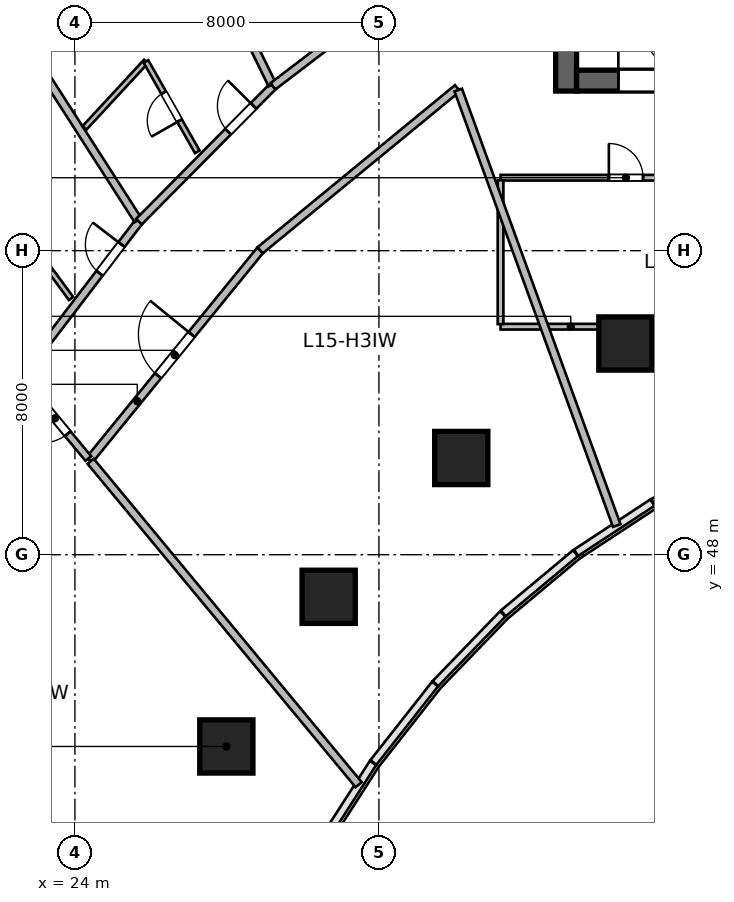
"""IFC4 building model, lengths in metres.
Left out: names, types, materials, properties, quantities, classifications, styles, units other than length and angle.
Written with IfcOpenShell. Run it as: python <this file> out.ifc"""

import sys

from ifc_helpers import new_model, si_unit, direction, frame, frame_2d, origin, origin_2d, place, context, subcontext, project, spatial, rectangle, circle, extrude, source, transform, mapped, element, fill, save


model = new_model("IFC4")
c1 = context("Model", 3, precision=1e-05, world=origin(), true_north=direction((0.0, 1.0)))
c2 = subcontext(c1, "Body", "Model", "MODEL_VIEW")
j1 = project(units=[si_unit("LENGTHUNIT", "METRE"), si_unit("PLANEANGLEUNIT", "RADIAN")], contexts=[c1])
p1 = place(None, origin())
s1 = spatial("IfcSite", under=j1, at=p1, CompositionType="ELEMENT")
p2 = place(p1, origin())
s2 = spatial("IfcBuilding", under=s1, at=p2, CompositionType="ELEMENT")
p3 = place(p2, frame((0.0, 0.0, 67.8)))
s3 = spatial("IfcBuildingStorey", under=s2, at=p3, CompositionType="ELEMENT", Elevation=67.8)
m1 = source(origin(), c2, "Body", "SweptSolid", [
    extrude(rectangle(XDim=12.0, YDim=0.55, at=frame_2d((6.0, 0.0))), origin(), (0.0, 0.0, 1.0), 3.6),
])
p4 = place(p3, frame((36.925, 60.2, 0.0), z_axis=(0.0, 0.0, 1.0), x_axis=(0.0, 1.0, 0.0)))
e1 = element("IfcWall", 1, at=p4, inside=s3, PredefinedType="SHEAR", context=c2, shape_type="MappedRepresentation", body=[
    mapped(m1, transform((0.0, 0.0, 0.0), scale=1.0)),
])
m2 = source(origin(), c2, "Body", "SweptSolid", [
    extrude(rectangle(XDim=21.6, YDim=0.55, at=frame_2d((10.8, 0.0))), origin(), (0.0, 0.0, 1.0), 3.6),
])
p5 = place(p3, frame((37.2, 60.475, 0.0), z_axis=(0.0, 0.0, 1.0), x_axis=(1.0, 0.0, 0.0)))
e2 = element("IfcWall", 2, at=p5, inside=s3, PredefinedType="SHEAR", context=c2, shape_type="MappedRepresentation", body=[
    mapped(m2, transform((0.0, 0.0, 0.0), scale=1.0)),
])
p6 = place(p5, frame((1.1, 0.0, 0.0)))
e3 = element("IfcOpeningElement", 3, at=p6, cuts=e2, PredefinedType="OPENING", context=c2, shape_type="SweptSolid", body=[
    extrude(rectangle(XDim=1.15, YDim=2.15, at=frame_2d((0.575, 1.075))), frame((0.0, 0.285, 0.0), z_axis=(0.0, -1.0, 0.0), x_axis=(1.0, 0.0, 0.0)), (0.0, 0.0, 1.0), 0.57),
])
p7 = place(p5, frame((19.5, 0.0, 0.0)))
e4 = element("IfcOpeningElement", 4, at=p7, cuts=e2, PredefinedType="OPENING", context=c2, shape_type="SweptSolid", body=[
    extrude(rectangle(XDim=0.9, YDim=2.1, at=frame_2d((0.45, 1.05))), frame((0.0, 0.285, 0.0), z_axis=(0.0, -1.0, 0.0), x_axis=(1.0, 0.0, 0.0)), (0.0, 0.0, 1.0), 0.57),
])
p8 = place(p5, frame((12.02, 0.0, 0.0)))
e5 = element("IfcOpeningElement", 5, at=p8, cuts=e2, PredefinedType="OPENING", context=c2, shape_type="SweptSolid", body=[
    extrude(rectangle(XDim=1.6, YDim=2.15, at=frame_2d((0.8, 1.075))), frame((0.0, 0.285, 0.0), z_axis=(0.0, -1.0, 0.0), x_axis=(1.0, 0.0, 0.0)), (0.0, 0.0, 1.0), 0.57),
])
m3 = source(origin(), c2, "Body", "SweptSolid", [
    extrude(circle(Radius=0.7, at=origin_2d()), origin(), (0.0, 0.0, 1.0), 3.6),
])
for number, where, z_axis, x_axis in (
    (6, (27.985, 42.955, 0.0), (0.0, 0.0, 1.0), (-0.691, 0.723, 0.0)),
    (7, (30.677, 46.892, 0.0), (0.0, 0.0, 1.0), (-0.571, 0.821, 0.0)),
    (8, (34.166, 50.545, 0.0), (0.0, 0.0, 1.0), (-0.436, 0.9, 0.0)),
    (9, (38.485, 53.558, 0.0), (0.0, 0.0, 1.0), (-0.289, 0.957, 0.0)),
):
    element("IfcColumn", number, at=place(p3, frame(where, z_axis=z_axis, x_axis=x_axis)), inside=s3, PredefinedType="COLUMN", context=c2, shape_type="MappedRepresentation", body=[
        mapped(m3, transform((0.0, 0.0, 0.0), scale=1.0)),
    ])
m4 = source(origin(), c2, "Body", "SweptSolid", [
    extrude(rectangle(XDim=6.6, YDim=0.15, at=frame_2d((3.3, 0.0))), origin(), (0.0, 0.0, 1.0), 2.803),
])
p9 = place(p3, frame((35.2, 54.0, 0.0), z_axis=(0.0, 0.0, 1.0), x_axis=(1.0, 0.0, 0.0)))
e10 = element("IfcWall", 10, at=p9, inside=s3, PredefinedType="PARTITIONING", context=c2, shape_type="MappedRepresentation", body=[
    mapped(m4, transform((0.0, 0.0, 0.0), scale=1.0)),
])
m5 = source(origin(), c2, "Body", "SweptSolid", [
    extrude(rectangle(XDim=6.6, YDim=0.15, at=frame_2d((3.3, 0.0))), origin(), (0.0, 0.0, 1.0), 3.36),
])
p10 = place(p3, frame((35.2, 57.92, 0.0), z_axis=(0.0, 0.0, 1.0), x_axis=(1.0, 0.0, 0.0)))
e11 = element("IfcWall", 11, at=p10, inside=s3, PredefinedType="PARTITIONING", context=c2, shape_type="MappedRepresentation", body=[
    mapped(m5, transform((0.0, 0.0, 0.0), scale=1.0)),
])
p11 = place(p10, frame((2.85, 0.0, 0.0)))
e12 = element("IfcOpeningElement", 12, at=p11, cuts=e11, PredefinedType="OPENING", context=c2, shape_type="SweptSolid", body=[
    extrude(rectangle(XDim=0.9, YDim=2.1, at=frame_2d((0.45, 1.05))), frame((0.0, 0.085, 0.0), z_axis=(0.0, -1.0, 0.0), x_axis=(1.0, 0.0, 0.0)), (0.0, 0.0, 1.0), 0.17),
])
m6 = source(origin(), c2, "Body", "SweptSolid", [
    extrude(rectangle(XDim=3.785, YDim=0.15, at=frame_2d((1.893, 0.0))), origin(), (0.0, 0.0, 1.0), 3.36),
])
p12 = place(p3, frame((35.2, 54.067, 0.0), z_axis=(0.0, 0.0, 1.0), x_axis=(0.0, 1.0, 0.0)))
e13 = element("IfcWall", 13, at=p12, inside=s3, PredefinedType="PARTITIONING", context=c2, shape_type="MappedRepresentation", body=[
    mapped(m6, transform((0.0, 0.0, 0.0), scale=1.0)),
])
m7 = source(origin(), c2, "Body", "SweptSolid", [
    extrude(rectangle(XDim=7.113, YDim=0.21, at=frame_2d((3.556, 0.0))), origin(), (0.0, 0.0, 1.0), 3.36),
])
p13 = place(p3, frame((24.383, 50.495, 0.0), z_axis=(0.0, 0.0, 1.0), x_axis=(0.63149032532, 0.775383755974, 0.0)))
e14 = element("IfcWall", 14, at=p13, inside=s3, PredefinedType="PARTITIONING", context=c2, shape_type="MappedRepresentation", body=[
    mapped(m7, transform((0.0, 0.0, 0.0), scale=1.0)),
])
p14 = place(p13, frame((2.856, 0.0, 0.0)))
e15 = element("IfcOpeningElement", 15, at=p14, cuts=e14, PredefinedType="OPENING", context=c2, shape_type="SweptSolid", body=[
    extrude(rectangle(XDim=1.4, YDim=2.15, at=frame_2d((0.7, 1.075))), frame((0.0, 0.115, 0.0), z_axis=(0.0, -1.0, 0.0), x_axis=(1.0, 0.0, 0.0)), (0.0, 0.0, 1.0), 0.23),
])
m8 = source(origin(), c2, "Body", "SweptSolid", [
    extrude(rectangle(XDim=6.721, YDim=0.21, at=frame_2d((3.361, 0.0))), origin(), (0.0, 0.0, 1.0), 3.36),
])
p15 = place(p3, frame((28.874, 56.01, 0.0), z_axis=(0.0, 0.0, 1.0), x_axis=(0.772828051199, 0.63461547671, 0.0)))
e16 = element("IfcWall", 16, at=p15, inside=s3, PredefinedType="PARTITIONING", context=c2, shape_type="MappedRepresentation", body=[
    mapped(m8, transform((0.0, 0.0, 0.0), scale=1.0)),
])
m9 = source(origin(), c2, "Body", "SweptSolid", [
    extrude(rectangle(XDim=11.053, YDim=0.21, at=frame_2d((5.527, 0.0))), origin(), (0.0, 0.0, 1.0), 3.36),
])
p16 = place(p3, frame((31.466, 41.949, 0.0), z_axis=(0.0, 0.0, 1.0), x_axis=(-0.638131235571, 0.769927611005, 0.0)))
e17 = element("IfcWall", 17, at=p16, inside=s3, PredefinedType="PARTITIONING", context=c2, shape_type="MappedRepresentation", body=[
    mapped(m9, transform((0.0, 0.0, 0.0), scale=1.0)),
])
m10 = source(origin(), c2, "Body", "SweptSolid", [
    extrude(rectangle(XDim=12.196, YDim=0.21, at=frame_2d((6.098, 0.0))), origin(), (0.0, 0.0, 1.0), 3.36),
])
p17 = place(p3, frame((38.258, 48.766, 0.0), z_axis=(0.0, 0.0, 1.0), x_axis=(-0.342022711534, 0.939691686031, 0.0)))
e18 = element("IfcWall", 18, at=p17, inside=s3, PredefinedType="PARTITIONING", context=c2, shape_type="MappedRepresentation", body=[
    mapped(m10, transform((0.0, 0.0, 0.0), scale=1.0)),
])
m11 = source(origin(), c2, "Body", "SweptSolid", [
    extrude(rectangle(XDim=5.135, YDim=0.21, at=frame_2d((2.567, 0.0))), origin(), (0.0, 0.0, 1.0), 3.36),
])
p18 = place(p3, frame((22.57, 52.683, 0.0), z_axis=(0.0, 0.0, 1.0), x_axis=(0.606802199649, 0.794852873494, 0.0)))
e19 = element("IfcWall", 19, at=p18, inside=s3, PredefinedType="PARTITIONING", context=c2, shape_type="MappedRepresentation", body=[
    mapped(m11, transform((0.0, 0.0, 0.0), scale=1.0)),
])
p19 = place(p18, frame((3.427, 0.0, 0.0)))
e20 = element("IfcOpeningElement", 20, at=p19, cuts=e19, PredefinedType="OPENING", context=c2, shape_type="SweptSolid", body=[
    extrude(rectangle(XDim=0.95, YDim=2.15, at=frame_2d((0.475, 1.075))), frame((0.0, 0.115, 0.0), z_axis=(0.0, -1.0, 0.0), x_axis=(1.0, 0.0, 0.0)), (0.0, 0.0, 1.0), 0.23),
])
m12 = source(origin(), c2, "Body", "SweptSolid", [
    extrude(rectangle(XDim=11.432, YDim=0.21, at=frame_2d((5.716, 0.0))), origin(), (0.0, 0.0, 1.0), 3.36),
])
p20 = place(p3, frame((25.659, 56.805, 0.0), z_axis=(0.0, 0.0, 1.0), x_axis=(-0.540196183124, 0.841539115988, 0.0)))
e21 = element("IfcWall", 21, at=p20, inside=s3, PredefinedType="PARTITIONING", context=c2, shape_type="MappedRepresentation", body=[
    mapped(m12, transform((0.0, 0.0, 0.0), scale=1.0)),
])
m13 = source(origin(), c2, "Body", "SweptSolid", [
    extrude(rectangle(XDim=2.642, YDim=0.14, at=frame_2d((1.321, 0.0))), origin(), (0.0, 0.0, 1.0), 3.36),
])
p21 = place(p3, frame((23.899, 54.741, 0.0), z_axis=(0.0, 0.0, 1.0), x_axis=(-0.592789122423, 0.805357719487, 0.0)))
e22 = element("IfcWall", 22, at=p21, inside=s3, PredefinedType="PARTITIONING", context=c2, shape_type="MappedRepresentation", body=[
    mapped(m13, transform((0.0, 0.0, 0.0), scale=1.0)),
])
p22 = place(p21, frame((0.896, 0.0, 0.0)))
e23 = element("IfcOpeningElement", 23, at=p22, cuts=e22, PredefinedType="OPENING", context=c2, shape_type="SweptSolid", body=[
    extrude(rectangle(XDim=0.85, YDim=2.05, at=frame_2d((0.425, 1.025))), frame((0.0, 0.08, 0.0), z_axis=(0.0, -1.0, 0.0), x_axis=(1.0, 0.0, 0.0)), (0.0, 0.0, 1.0), 0.16),
])
m14 = source(origin(), c2, "Body", "SweptSolid", [
    extrude(rectangle(XDim=5.012, YDim=0.21, at=frame_2d((2.506, 0.0))), origin(), (0.0, 0.0, 1.0), 3.36),
])
p23 = place(p3, frame((25.685, 56.764, 0.0), z_axis=(0.0, 0.0, 1.0), x_axis=(0.703664626435, 0.710532260707, 0.0)))
e24 = element("IfcWall", 24, at=p23, inside=s3, PredefinedType="PARTITIONING", context=c2, shape_type="MappedRepresentation", body=[
    mapped(m14, transform((0.0, 0.0, 0.0), scale=1.0)),
])
p24 = place(p23, frame((3.335, 0.0, 0.0)))
e25 = element("IfcOpeningElement", 25, at=p24, cuts=e24, PredefinedType="OPENING", context=c2, shape_type="SweptSolid", body=[
    extrude(rectangle(XDim=0.95, YDim=2.15, at=frame_2d((0.475, 1.075))), frame((0.0, 0.115, 0.0), z_axis=(0.0, -1.0, 0.0), x_axis=(1.0, 0.0, 0.0)), (0.0, 0.0, 1.0), 0.23),
])
m15 = source(origin(), c2, "Body", "SweptSolid", [
    extrude(rectangle(XDim=11.775, YDim=0.21, at=frame_2d((5.887, 0.0))), origin(), (0.0, 0.0, 1.0), 2.644),
])
p25 = place(p3, frame((29.19, 60.371, 0.0), z_axis=(0.0, 0.0, 1.0), x_axis=(-0.4401500056, 0.897924257702, 0.0)))
e26 = element("IfcWall", 26, at=p25, inside=s3, PredefinedType="PARTITIONING", context=c2, shape_type="MappedRepresentation", body=[
    mapped(m15, transform((0.0, 0.0, 0.0), scale=1.0)),
])
m16 = source(origin(), c2, "Body", "SweptSolid", [
    extrude(rectangle(XDim=2.38, YDim=0.14, at=frame_2d((1.19, 0.0))), origin(), (0.0, 0.0, 1.0), 3.36),
])
p26 = place(p3, frame((24.253, 59.231, 0.0), z_axis=(0.0, 0.0, 1.0), x_axis=(0.679084816758, 0.734059814762, 0.0)))
e27 = element("IfcWall", 27, at=p26, inside=s3, PredefinedType="PARTITIONING", context=c2, shape_type="MappedRepresentation", body=[
    mapped(m16, transform((0.0, 0.0, 0.0), scale=1.0)),
])
m17 = source(origin(), c2, "Body", "SweptSolid", [
    extrude(rectangle(XDim=2.735, YDim=0.14, at=frame_2d((1.367, 0.0))), origin(), (0.0, 0.0, 1.0), 3.36),
])
p27 = place(p3, frame((27.219, 58.6, 0.0), z_axis=(0.0, 0.0, 1.0), x_axis=(-0.493694940578, 0.869635156631, 0.0)))
e28 = element("IfcWall", 28, at=p27, inside=s3, PredefinedType="PARTITIONING", context=c2, shape_type="MappedRepresentation", body=[
    mapped(m17, transform((0.0, 0.0, 0.0), scale=1.0)),
])
p28 = place(p27, frame((0.942, 0.0, 0.0)))
e29 = element("IfcOpeningElement", 29, at=p28, cuts=e28, PredefinedType="OPENING", context=c2, shape_type="SweptSolid", body=[
    extrude(rectangle(XDim=0.85, YDim=2.05, at=frame_2d((0.425, 1.025))), frame((0.0, 0.08, 0.0), z_axis=(0.0, -1.0, 0.0), x_axis=(1.0, 0.0, 0.0)), (0.0, 0.0, 1.0), 0.16),
])
m18 = source(origin(), c2, "Body", "SweptSolid", [
    extrude(rectangle(XDim=4.762, YDim=0.21, at=frame_2d((2.381, 0.0))), origin(), (0.0, 0.0, 1.0), 3.36),
])
p29 = place(p3, frame((29.212, 60.326, 0.0), z_axis=(0.0, 0.0, 1.0), x_axis=(0.795070295872, 0.60651729128, 0.0)))
e30 = element("IfcWall", 30, at=p29, inside=s3, PredefinedType="PARTITIONING", context=c2, shape_type="MappedRepresentation", body=[
    mapped(m18, transform((0.0, 0.0, 0.0), scale=1.0)),
])
p30 = place(p29, frame((3.144, 0.0, 0.0)))
e31 = element("IfcOpeningElement", 31, at=p30, cuts=e30, PredefinedType="OPENING", context=c2, shape_type="SweptSolid", body=[
    extrude(rectangle(XDim=0.95, YDim=2.15, at=frame_2d((0.475, 1.075))), frame((0.0, 0.115, 0.0), z_axis=(0.0, -1.0, 0.0), x_axis=(1.0, 0.0, 0.0)), (0.0, 0.0, 1.0), 0.23),
])
m19 = source(origin(), c2, "Body", "SweptSolid", [
    extrude(rectangle(XDim=2.748, YDim=0.195, at=frame_2d((1.374, 0.0))), origin(), (0.0, 0.0, 1.0), 3.36),
])
p31 = place(p3, frame((24.353, 50.531, 0.0), z_axis=(0.0, 0.0, 1.0), x_axis=(-0.638111168284, 0.769944242729, 0.0)))
e32 = element("IfcWall", 32, at=p31, inside=s3, PredefinedType="PARTITIONING", context=c2, shape_type="MappedRepresentation", body=[
    mapped(m19, transform((0.0, 0.0, 0.0), scale=1.0)),
])
p32 = place(p31, frame((0.849, 0.0, 0.0)))
e33 = element("IfcOpeningElement", 33, at=p32, cuts=e32, PredefinedType="OPENING", context=c2, shape_type="SweptSolid", body=[
    extrude(rectangle(XDim=1.05, YDim=2.15, at=frame_2d((0.525, 1.075))), frame((0.0, 0.107, 0.0), z_axis=(0.0, -1.0, 0.0), x_axis=(1.0, 0.0, 0.0)), (0.0, 0.0, 1.0), 0.215),
])
m20 = source(origin(), c2, "Body", "SweptSolid", [
    extrude(rectangle(XDim=1.15, YDim=2.15, at=frame_2d((0.575, 1.075))), frame((0.0, 0.025, 0.0), z_axis=(0.0, -1.0, 0.0), x_axis=(1.0, 0.0, 0.0)), (0.0, 0.0, 1.0), 0.05),
])
p33 = place(p6, origin())
e34 = element("IfcDoor", 34, at=p33, inside=s3, OperationType="SINGLE_SWING_LEFT", PredefinedType="DOOR", context=c2, shape_type="MappedRepresentation", body=[
    mapped(m20, transform((0.0, 0.0, 0.0), scale=1.0)),
])
fill(e3, e34)
m21 = source(origin(), c2, "Body", "SweptSolid", [
    extrude(rectangle(XDim=0.9, YDim=2.1, at=frame_2d((0.45, 1.05))), frame((0.0, 0.025, 0.0), z_axis=(0.0, -1.0, 0.0), x_axis=(1.0, 0.0, 0.0)), (0.0, 0.0, 1.0), 0.05),
])
p34 = place(p11, origin())
e35 = element("IfcDoor", 35, at=p34, inside=s3, OperationType="SINGLE_SWING_LEFT", PredefinedType="DOOR", context=c2, shape_type="MappedRepresentation", body=[
    mapped(m21, transform((0.0, 0.0, 0.0), scale=1.0)),
])
fill(e12, e35)
m22 = source(origin(), c2, "Body", "SweptSolid", [
    extrude(rectangle(XDim=1.4, YDim=2.15, at=frame_2d((0.7, 1.075))), frame((0.0, 0.025, 0.0), z_axis=(0.0, -1.0, 0.0), x_axis=(1.0, 0.0, 0.0)), (0.0, 0.0, 1.0), 0.05),
])
p35 = place(p14, origin())
e36 = element("IfcDoor", 36, at=p35, inside=s3, OperationType="SINGLE_SWING_RIGHT", PredefinedType="DOOR", context=c2, shape_type="MappedRepresentation", body=[
    mapped(m22, transform((0.0, 0.0, 0.0), scale=1.0)),
])
fill(e15, e36)
m23 = source(origin(), c2, "Body", "SweptSolid", [
    extrude(rectangle(XDim=0.95, YDim=2.15, at=frame_2d((0.475, 1.075))), frame((0.0, 0.025, 0.0), z_axis=(0.0, -1.0, 0.0), x_axis=(1.0, 0.0, 0.0)), (0.0, 0.0, 1.0), 0.05),
])
p36 = place(p19, origin())
e37 = element("IfcDoor", 37, at=p36, inside=s3, OperationType="SINGLE_SWING_RIGHT", PredefinedType="DOOR", context=c2, shape_type="MappedRepresentation", body=[
    mapped(m23, transform((0.0, 0.0, 0.0), scale=1.0)),
])
fill(e20, e37)
p37 = place(p24, origin())
e38 = element("IfcDoor", 38, at=p37, inside=s3, OperationType="SINGLE_SWING_RIGHT", PredefinedType="DOOR", context=c2, shape_type="MappedRepresentation", body=[
    mapped(m23, transform((0.0, 0.0, 0.0), scale=1.0)),
])
fill(e25, e38)
m24 = source(origin(), c2, "Body", "SweptSolid", [
    extrude(rectangle(XDim=0.85, YDim=2.05, at=frame_2d((0.425, 1.025))), frame((0.0, 0.025, 0.0), z_axis=(0.0, -1.0, 0.0), x_axis=(1.0, 0.0, 0.0)), (0.0, 0.0, 1.0), 0.05),
])
p38 = place(p28, origin())
e39 = element("IfcDoor", 39, at=p38, inside=s3, OperationType="SINGLE_SWING_LEFT", PredefinedType="DOOR", context=c2, shape_type="MappedRepresentation", body=[
    mapped(m24, transform((0.0, 0.0, 0.0), scale=1.0)),
])
fill(e29, e39)
m25 = source(origin(), c2, "Body", "SweptSolid", [
    extrude(rectangle(XDim=1.05, YDim=2.15, at=frame_2d((0.525, 1.075))), frame((0.0, 0.025, 0.0), z_axis=(0.0, -1.0, 0.0), x_axis=(1.0, 0.0, 0.0)), (0.0, 0.0, 1.0), 0.05),
])
p39 = place(p32, origin())
e40 = element("IfcDoor", 40, at=p39, inside=s3, OperationType="SINGLE_SWING_RIGHT", PredefinedType="DOOR", context=c2, shape_type="MappedRepresentation", body=[
    mapped(m25, transform((0.0, 0.0, 0.0), scale=1.0)),
])
fill(e33, e40)
save(model, sys.argv[1])
